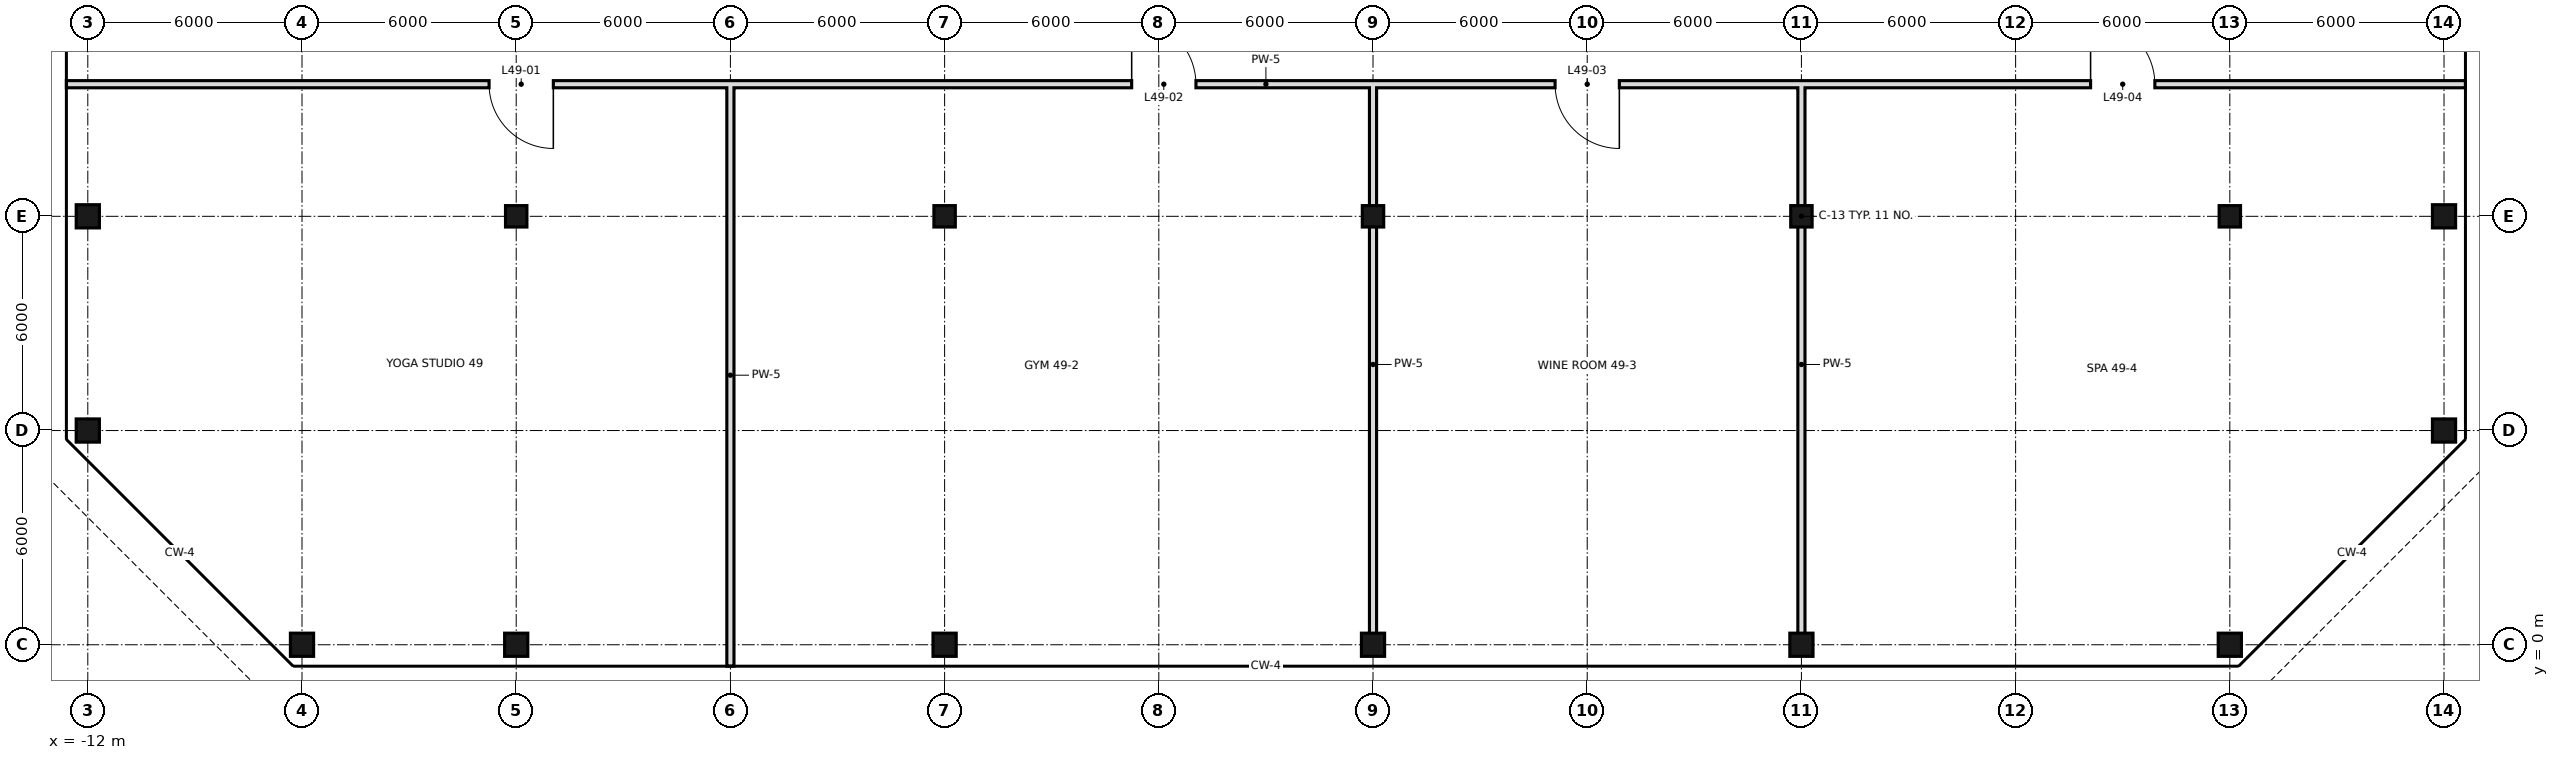
"""IFC4 building model, lengths in metres.
Left out: names, types, materials, properties, quantities, classifications, styles, units other than length and angle.
Written with IfcOpenShell. Run it as: python <this file> out.ifc"""

import sys

from ifc_helpers import new_model, si_unit, direction, frame, frame_2d, origin, origin_2d, place, context, subcontext, project, spatial, rectangle, hollow_rectangle, extrude, element, fill, save


model = new_model("IFC4")
c1 = context("Model", 3, precision=1e-05, world=origin(), true_north=direction((0.0, 1.0)))
c2 = subcontext(c1, "Body", "Model", "MODEL_VIEW")
j1 = project(units=[si_unit("LENGTHUNIT", "METRE"), si_unit("PLANEANGLEUNIT", "RADIAN")], contexts=[c1])
p1 = place(None, origin())
s1 = spatial("IfcSite", under=j1, at=p1, CompositionType="ELEMENT")
p2 = place(p1, origin())
s2 = spatial("IfcBuilding", under=s1, at=p2, CompositionType="ELEMENT")
p3 = place(p2, frame((0.0, 0.0, 210.0)))
s3 = spatial("IfcBuildingStorey", under=s2, at=p3, CompositionType="ELEMENT", Elevation=210.0)
for number, where, z_axis, x_axis in (
    (1, (-12.0, 6.0, 0.0), (0.0, 0.0, 1.0), (1.0, 0.0, 0.0)),
    (2, (-12.0, 12.0, 0.0), (0.0, 0.0, 1.0), (1.0, 0.0, 0.0)),
    (3, (-6.0, 0.0, 0.0), (0.0, 0.0, 1.0), (1.0, 0.0, 0.0)),
    (4, (0.0, 0.0, 0.0), (0.0, 0.0, 1.0), (1.0, 0.0, 0.0)),
):
    element("IfcColumn", number, at=place(p3, frame(where, z_axis=z_axis, x_axis=x_axis)), inside=s3, PredefinedType="COLUMN", context=c2, shape_type="SweptSolid", body=[
        extrude(hollow_rectangle(XDim=0.65, YDim=0.65, WallThickness=0.032, at=origin_2d()), origin(), (0.0, 0.0, 1.0), 5.4),
    ])
p4 = place(p3, frame((0.0, 12.0, 0.0), z_axis=(0.0, 0.0, 1.0), x_axis=(1.0, 0.0, 0.0)))
e5 = element("IfcColumn", 5, at=p4, inside=s3, PredefinedType="COLUMN", context=c2, shape_type="SweptSolid", body=[
    extrude(hollow_rectangle(XDim=0.6, YDim=0.6, WallThickness=0.028, at=origin_2d()), origin(), (0.0, 0.0, 1.0), 5.4),
])
p5 = place(p3, frame((12.0, 0.0, 0.0), z_axis=(0.0, 0.0, 1.0), x_axis=(1.0, 0.0, 0.0)))
e6 = element("IfcColumn", 6, at=p5, inside=s3, PredefinedType="COLUMN", context=c2, shape_type="SweptSolid", body=[
    extrude(hollow_rectangle(XDim=0.65, YDim=0.65, WallThickness=0.032, at=origin_2d()), origin(), (0.0, 0.0, 1.0), 5.4),
])
p6 = place(p3, frame((12.0, 12.0, 0.0), z_axis=(0.0, 0.0, 1.0), x_axis=(1.0, 0.0, 0.0)))
e7 = element("IfcColumn", 7, at=p6, inside=s3, PredefinedType="COLUMN", context=c2, shape_type="SweptSolid", body=[
    extrude(hollow_rectangle(XDim=0.6, YDim=0.6, WallThickness=0.028, at=origin_2d()), origin(), (0.0, 0.0, 1.0), 5.4),
])
p7 = place(p3, frame((24.0, 0.0, 0.0), z_axis=(0.0, 0.0, 1.0), x_axis=(1.0, 0.0, 0.0)))
e8 = element("IfcColumn", 8, at=p7, inside=s3, PredefinedType="COLUMN", context=c2, shape_type="SweptSolid", body=[
    extrude(hollow_rectangle(XDim=0.65, YDim=0.65, WallThickness=0.032, at=origin_2d()), origin(), (0.0, 0.0, 1.0), 5.4),
])
p8 = place(p3, frame((24.0, 12.0, 0.0), z_axis=(0.0, 0.0, 1.0), x_axis=(1.0, 0.0, 0.0)))
e9 = element("IfcColumn", 9, at=p8, inside=s3, PredefinedType="COLUMN", context=c2, shape_type="SweptSolid", body=[
    extrude(hollow_rectangle(XDim=0.6, YDim=0.6, WallThickness=0.028, at=origin_2d()), origin(), (0.0, 0.0, 1.0), 5.4),
])
p9 = place(p3, frame((36.0, 0.0, 0.0), z_axis=(0.0, 0.0, 1.0), x_axis=(1.0, 0.0, 0.0)))
e10 = element("IfcColumn", 10, at=p9, inside=s3, PredefinedType="COLUMN", context=c2, shape_type="SweptSolid", body=[
    extrude(hollow_rectangle(XDim=0.65, YDim=0.65, WallThickness=0.032, at=origin_2d()), origin(), (0.0, 0.0, 1.0), 5.4),
])
p10 = place(p3, frame((36.0, 12.0, 0.0), z_axis=(0.0, 0.0, 1.0), x_axis=(1.0, 0.0, 0.0)))
e11 = element("IfcColumn", 11, at=p10, inside=s3, PredefinedType="COLUMN", context=c2, shape_type="SweptSolid", body=[
    extrude(hollow_rectangle(XDim=0.6, YDim=0.6, WallThickness=0.028, at=origin_2d()), origin(), (0.0, 0.0, 1.0), 5.4),
])
p11 = place(p3, frame((48.0, 0.0, 0.0), z_axis=(0.0, 0.0, 1.0), x_axis=(1.0, 0.0, 0.0)))
e12 = element("IfcColumn", 12, at=p11, inside=s3, PredefinedType="COLUMN", context=c2, shape_type="SweptSolid", body=[
    extrude(hollow_rectangle(XDim=0.65, YDim=0.65, WallThickness=0.032, at=origin_2d()), origin(), (0.0, 0.0, 1.0), 5.4),
])
p12 = place(p3, frame((48.0, 12.0, 0.0), z_axis=(0.0, 0.0, 1.0), x_axis=(1.0, 0.0, 0.0)))
e13 = element("IfcColumn", 13, at=p12, inside=s3, PredefinedType="COLUMN", context=c2, shape_type="SweptSolid", body=[
    extrude(hollow_rectangle(XDim=0.6, YDim=0.6, WallThickness=0.028, at=origin_2d()), origin(), (0.0, 0.0, 1.0), 5.4),
])
for number, where, z_axis, x_axis in (
    (14, (54.0, 6.0, 0.0), (0.0, 0.0, 1.0), (1.0, 0.0, 0.0)),
    (15, (54.0, 12.0, 0.0), (0.0, 0.0, 1.0), (1.0, 0.0, 0.0)),
):
    element("IfcColumn", number, at=place(p3, frame(where, z_axis=z_axis, x_axis=x_axis)), inside=s3, PredefinedType="COLUMN", context=c2, shape_type="SweptSolid", body=[
        extrude(hollow_rectangle(XDim=0.65, YDim=0.65, WallThickness=0.032, at=origin_2d()), origin(), (0.0, 0.0, 1.0), 5.4),
    ])
for number, where, z_axis, x_axis in (
    (16, (24.0, 0.0, 0.0), (0.0, 0.0, 1.0), (0.0, 1.0, 0.0)),
    (17, (36.0, 0.0, 0.0), (0.0, 0.0, 1.0), (0.0, 1.0, 0.0)),
):
    element("IfcWall", number, at=place(p3, frame(where, z_axis=z_axis, x_axis=x_axis)), inside=s3, PredefinedType="SOLIDWALL", context=c2, shape_type="SweptSolid", body=[
        extrude(rectangle(XDim=15.7, YDim=0.2, at=frame_2d((7.85, 0.0))), origin(), (0.0, 0.0, 1.0), 4.52),
    ])
p13 = place(p3, frame((6.0, -0.6, 0.0), z_axis=(0.0, 0.0, 1.0), x_axis=(0.0, 1.0, 0.0)))
e18 = element("IfcWall", 18, at=p13, inside=s3, PredefinedType="SOLIDWALL", context=c2, shape_type="SweptSolid", body=[
    extrude(rectangle(XDim=16.3, YDim=0.2, at=frame_2d((8.15, 0.0))), origin(), (0.0, 0.0, 1.0), 4.52),
])
p14 = place(p3, frame((-12.6, 15.7, 0.0), z_axis=(0.0, 0.0, 1.0), x_axis=(1.0, 0.0, 0.0)))
e19 = element("IfcWall", 19, at=p14, inside=s3, PredefinedType="SOLIDWALL", context=c2, shape_type="SweptSolid", body=[
    extrude(rectangle(XDim=67.2, YDim=0.2, at=frame_2d((33.6, 0.0))), origin(), (0.0, 0.0, 1.0), 4.52),
])
p15 = place(p14, frame((11.84, 0.0, 0.0)))
e20 = element("IfcOpeningElement", 20, at=p15, cuts=e19, PredefinedType="OPENING", context=c2, shape_type="SweptSolid", body=[
    extrude(rectangle(XDim=1.8, YDim=2.4, at=frame_2d((0.9, 1.2))), frame((0.0, 0.11, 0.0), z_axis=(0.0, -1.0, 0.0), x_axis=(1.0, 0.0, 0.0)), (0.0, 0.0, 1.0), 0.22),
])
p16 = place(p14, frame((29.84, 0.0, 0.0)))
e21 = element("IfcOpeningElement", 21, at=p16, cuts=e19, PredefinedType="OPENING", context=c2, shape_type="SweptSolid", body=[
    extrude(rectangle(XDim=1.8, YDim=2.4, at=frame_2d((0.9, 1.2))), frame((0.0, 0.11, 0.0), z_axis=(0.0, -1.0, 0.0), x_axis=(1.0, 0.0, 0.0)), (0.0, 0.0, 1.0), 0.22),
])
p17 = place(p14, frame((41.7, 0.0, 0.0)))
e22 = element("IfcOpeningElement", 22, at=p17, cuts=e19, PredefinedType="OPENING", context=c2, shape_type="SweptSolid", body=[
    extrude(rectangle(XDim=1.8, YDim=2.4, at=frame_2d((0.9, 1.2))), frame((0.0, 0.11, 0.0), z_axis=(0.0, -1.0, 0.0), x_axis=(1.0, 0.0, 0.0)), (0.0, 0.0, 1.0), 0.22),
])
p18 = place(p14, frame((56.7, 0.0, 0.0)))
e23 = element("IfcOpeningElement", 23, at=p18, cuts=e19, PredefinedType="OPENING", context=c2, shape_type="SweptSolid", body=[
    extrude(rectangle(XDim=1.8, YDim=2.4, at=frame_2d((0.9, 1.2))), frame((0.0, 0.11, 0.0), z_axis=(0.0, -1.0, 0.0), x_axis=(1.0, 0.0, 0.0)), (0.0, 0.0, 1.0), 0.22),
])
p19 = place(p15, origin())
e24 = element("IfcDoor", 24, at=p19, inside=s3, OperationType="SINGLE_SWING_RIGHT", PredefinedType="DOOR", context=c2, shape_type="SweptSolid", body=[
    extrude(rectangle(XDim=1.8, YDim=2.4, at=frame_2d((0.9, 1.2))), frame((0.0, 0.025, 0.0), z_axis=(0.0, -1.0, 0.0), x_axis=(1.0, 0.0, 0.0)), (0.0, 0.0, 1.0), 0.05),
])
fill(e20, e24)
p20 = place(p16, origin())
e25 = element("IfcDoor", 25, at=p20, inside=s3, OperationType="SINGLE_SWING_LEFT", PredefinedType="DOOR", context=c2, shape_type="SweptSolid", body=[
    extrude(rectangle(XDim=1.8, YDim=2.4, at=frame_2d((0.9, 1.2))), frame((0.0, 0.025, 0.0), z_axis=(0.0, -1.0, 0.0), x_axis=(1.0, 0.0, 0.0)), (0.0, 0.0, 1.0), 0.05),
])
fill(e21, e25)
p21 = place(p17, origin())
e26 = element("IfcDoor", 26, at=p21, inside=s3, OperationType="SINGLE_SWING_RIGHT", PredefinedType="DOOR", context=c2, shape_type="SweptSolid", body=[
    extrude(rectangle(XDim=1.8, YDim=2.4, at=frame_2d((0.9, 1.2))), frame((0.0, 0.025, 0.0), z_axis=(0.0, -1.0, 0.0), x_axis=(1.0, 0.0, 0.0)), (0.0, 0.0, 1.0), 0.05),
])
fill(e22, e26)
p22 = place(p18, origin())
e27 = element("IfcDoor", 27, at=p22, inside=s3, OperationType="SINGLE_SWING_LEFT", PredefinedType="DOOR", context=c2, shape_type="SweptSolid", body=[
    extrude(rectangle(XDim=1.8, YDim=2.4, at=frame_2d((0.9, 1.2))), frame((0.0, 0.025, 0.0), z_axis=(0.0, -1.0, 0.0), x_axis=(1.0, 0.0, 0.0)), (0.0, 0.0, 1.0), 0.05),
])
fill(e23, e27)
save(model, sys.argv[1])
